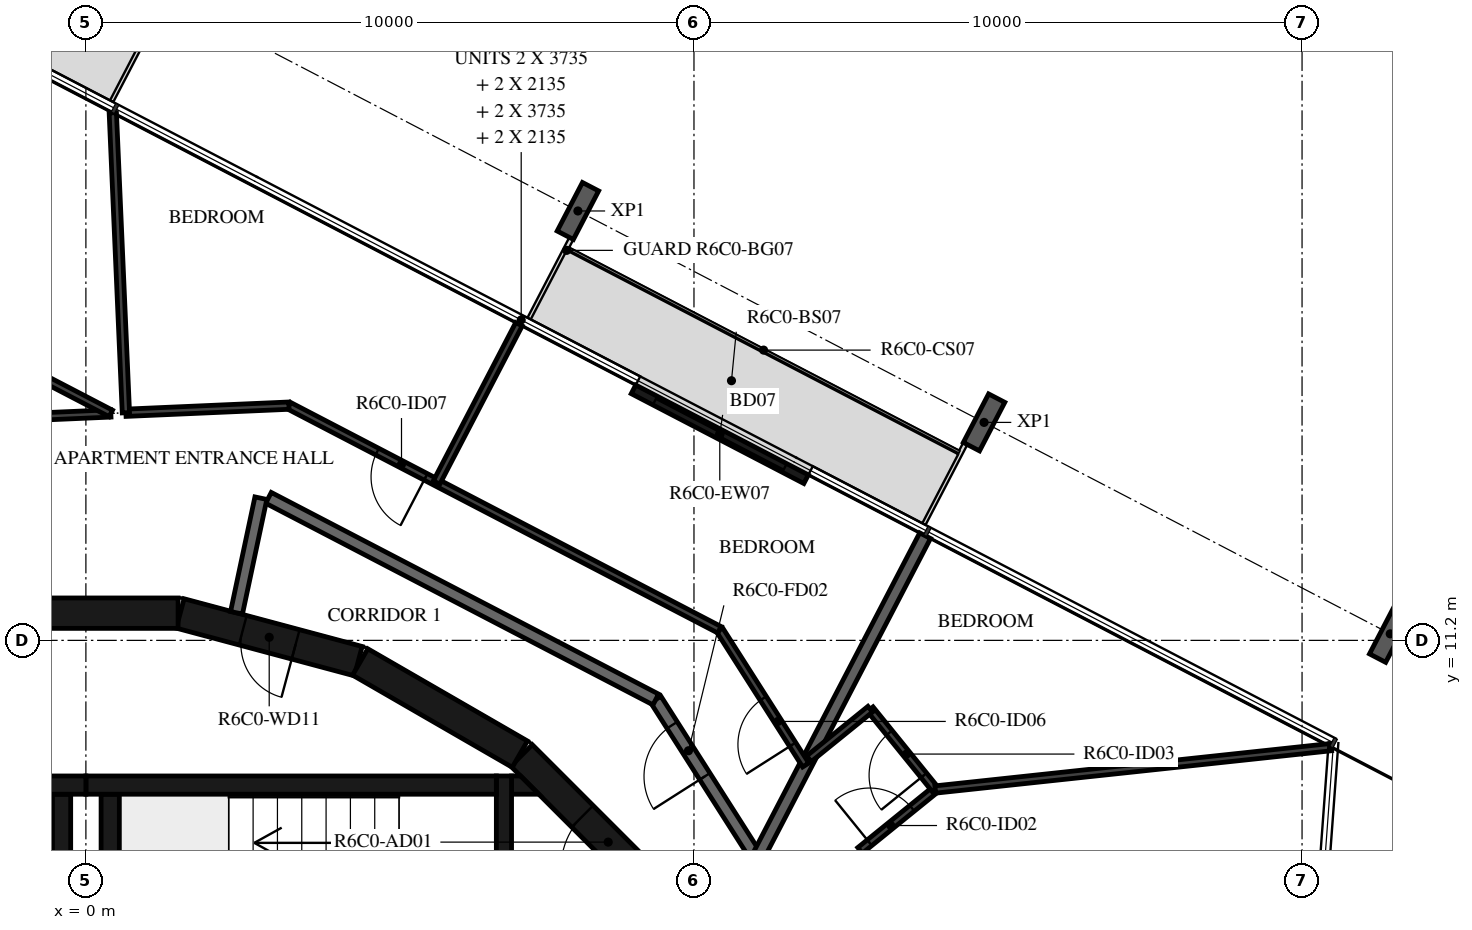
"""IFC4 building model, lengths in metres.
Left out: names, types, materials, properties, quantities, classifications, styles, units other than length and angle.
Written with IfcOpenShell. Run it as: python <this file> out.ifc"""

import sys

from ifc_helpers import new_model, si_unit, direction, frame, frame_2d, origin, origin_2d, place, context, subcontext, project, spatial, polyline, rectangle, i_section, outline, extrude, element, fill, save


model = new_model("IFC4")
c1 = context("Model", 3, precision=1e-05, world=origin(), true_north=direction((0.0, 1.0)))
c2 = subcontext(c1, "Body", "Model", "MODEL_VIEW")
j1 = project(units=[si_unit("LENGTHUNIT", "METRE"), si_unit("PLANEANGLEUNIT", "RADIAN")], contexts=[c1])
p1 = place(None, origin())
s1 = spatial("IfcSite", under=j1, at=p1, CompositionType="ELEMENT")
p2 = place(p1, origin())
s2 = spatial("IfcBuilding", under=s1, at=p2, CompositionType="ELEMENT")
p3 = place(p2, frame((0.0, 0.0, 254.7)))
s3 = spatial("IfcBuildingStorey", under=s2, at=p3, CompositionType="ELEMENT", Elevation=254.7)
for number, where, z_axis, x_axis in (
    (1, (21.45, 11.308, -0.38), (0.0, 0.0, 1.0), (0.887, -0.462, 0.0)),
    (2, (14.771, 14.784, -0.38), (0.0, 0.0, 1.0), (0.887, -0.462, 0.0)),
    (3, (8.091, 18.261, -0.38), (0.0, 0.0, 1.0), (0.887, -0.462, 0.0)),
):
    element("IfcColumn", number, at=place(p3, frame(where, z_axis=z_axis, x_axis=x_axis)), inside=s3, PredefinedType="COLUMN", context=c2, shape_type="SweptSolid", body=[
        extrude(i_section(OverallWidth=0.3, OverallDepth=0.9, WebThickness=0.019, FlangeThickness=0.035, FilletRadius=0.03, at=origin_2d()), origin(), (0.0, 0.0, 1.0), 2.616),
    ])
p4 = place(p3, frame((11.844, 13.851, 0.0), z_axis=(0.0, 0.0, 1.0), x_axis=(-0.887014349583, 0.461741858221, 0.0)))
e4 = element("IfcWall", 4, at=p4, inside=s3, PredefinedType="STANDARD", context=c2, shape_type="SweptSolid", body=[
    extrude(rectangle(XDim=3.2, YDim=0.16, at=frame_2d((1.6, 0.0))), origin(), (0.0, 0.0, 1.0), 3.05),
])
p5 = place(p4, frame((0.4, 0.0, 0.0)))
e5 = element("IfcOpeningElement", 5, at=p5, cuts=e4, PredefinedType="OPENING", context=c2, shape_type="SweptSolid", body=[
    extrude(rectangle(XDim=2.4, YDim=2.4, at=frame_2d((1.2, 1.2))), frame((0.0, 0.09, 0.0), z_axis=(0.0, -1.0, 0.0), x_axis=(1.0, 0.0, 0.0)), (0.0, 0.0, 1.0), 0.18),
])
p6 = place(p3, frame((9.308, 7.164, 0.0), z_axis=(0.0, 0.0, 1.0), x_axis=(-0.707106781187, 0.707106781187, 0.0)))
e6 = element("IfcWall", 6, at=p6, inside=s3, PredefinedType="SHEAR", context=c2, shape_type="SweptSolid", body=[
    extrude(rectangle(XDim=3.032, YDim=0.5, at=frame_2d((1.516, 0.0))), origin(), (0.0, 0.0, 1.0), 3.05),
])
p7 = place(p6, frame((0.416, 0.0, 0.0)))
e7 = element("IfcOpeningElement", 7, at=p7, cuts=e6, PredefinedType="OPENING", context=c2, shape_type="SweptSolid", body=[
    extrude(rectangle(XDim=1.2, YDim=2.1, at=frame_2d((0.6, 1.05))), frame((0.0, 0.26, 0.0), z_axis=(0.0, -1.0, 0.0), x_axis=(1.0, 0.0, 0.0)), (0.0, 0.0, 1.0), 0.52),
])
p8 = place(p3, frame((7.137, 9.329, 0.0), z_axis=(0.0, 0.0, 1.0), x_axis=(-0.865975092491, 0.500087131594, 0.0)))
e8 = element("IfcWall", 8, at=p8, inside=s3, PredefinedType="SHEAR", context=c2, shape_type="SweptSolid", body=[
    extrude(rectangle(XDim=3.033, YDim=0.5, at=frame_2d((1.516, 0.0))), origin(), (0.0, 0.0, 1.0), 3.05),
])
p9 = place(p3, frame((4.479, 10.858, 0.0), z_axis=(0.0, 0.0, 1.0), x_axis=(-0.965948410781, 0.258734743916, 0.0)))
e9 = element("IfcWall", 9, at=p9, inside=s3, PredefinedType="SHEAR", context=c2, shape_type="SweptSolid", body=[
    extrude(rectangle(XDim=3.033, YDim=0.5, at=frame_2d((1.516, 0.0))), origin(), (0.0, 0.0, 1.0), 3.05),
])
p10 = place(p9, frame((1.066, 0.0, 0.0)))
e10 = element("IfcOpeningElement", 10, at=p10, cuts=e9, PredefinedType="OPENING", context=c2, shape_type="SweptSolid", body=[
    extrude(rectangle(XDim=0.9, YDim=2.1, at=frame_2d((0.45, 1.05))), frame((0.0, 0.26, 0.0), z_axis=(0.0, -1.0, 0.0), x_axis=(1.0, 0.0, 0.0)), (0.0, 0.0, 1.0), 0.52),
])
p11 = place(p3, frame((1.516, 11.647, 0.0), z_axis=(0.0, 0.0, 1.0), x_axis=(-1.0, 0.0, 0.0)))
e11 = element("IfcWall", 11, at=p11, inside=s3, PredefinedType="SHEAR", context=c2, shape_type="SweptSolid", body=[
    extrude(rectangle(XDim=3.033, YDim=0.5, at=frame_2d((1.516, 0.0))), origin(), (0.0, 0.0, 1.0), 3.05),
])
p12 = place(p3, frame((0.0, 8.82, 0.0), z_axis=(0.0, 0.0, 1.0), x_axis=(1.0, 0.0, 0.0)))
e12 = element("IfcWall", 12, at=p12, inside=s3, PredefinedType="SHEAR", context=c2, shape_type="SweptSolid", body=[
    extrude(rectangle(XDim=6.75, YDim=0.3, at=frame_2d((3.375, 0.0))), origin(), (0.0, 0.0, 1.0), 3.05),
])
p13 = place(p3, frame((0.4, 5.35, 0.0), z_axis=(0.0, 0.0, 1.0), x_axis=(0.0, 1.0, 0.0)))
e13 = element("IfcWall", 13, at=p13, inside=s3, PredefinedType="SHEAR", context=c2, shape_type="SweptSolid", body=[
    extrude(rectangle(XDim=3.32, YDim=0.3, at=frame_2d((1.66, 0.0))), origin(), (0.0, 0.0, 1.0), 3.05),
])
p14 = place(p3, frame((6.875, 5.05, 0.0), z_axis=(0.0, 0.0, 1.0), x_axis=(0.0, 1.0, 0.0)))
e14 = element("IfcWall", 14, at=p14, inside=s3, PredefinedType="SHEAR", context=c2, shape_type="SweptSolid", body=[
    extrude(rectangle(XDim=3.92, YDim=0.25, at=frame_2d((1.96, 0.0))), origin(), (0.0, 0.0, 1.0), 3.05),
])
p15 = place(p14, frame((1.11, 0.0, 0.0)))
e15 = element("IfcOpeningElement", 15, at=p15, cuts=e14, PredefinedType="OPENING", context=c2, shape_type="SweptSolid", body=[
    extrude(rectangle(XDim=1.2, YDim=2.1, at=frame_2d((0.6, 1.05))), frame((0.0, 0.135, 0.0), z_axis=(0.0, -1.0, 0.0), x_axis=(1.0, 0.0, 0.0)), (0.0, 0.0, 1.0), 0.27),
])
p16 = place(p3, origin())
e16 = element("IfcWall", 16, at=p16, inside=s3, PredefinedType="SHEAR", context=c2, shape_type="SweptSolid", body=[
    extrude(outline(polyline([(7.448, 8.67), (7.0, 8.67), (7.0, 8.97), (7.148, 8.97), (7.448, 8.67)])), origin(), (0.0, 0.0, 1.0), 3.05),
])
p17 = place(p3, frame((-6.75, 8.82, 0.0), z_axis=(0.0, 0.0, 1.0), x_axis=(1.0, 0.0, 0.0)))
e17 = element("IfcWall", 17, at=p17, inside=s3, PredefinedType="SHEAR", context=c2, shape_type="SweptSolid", body=[
    extrude(rectangle(XDim=6.75, YDim=0.3, at=frame_2d((3.375, 0.0))), origin(), (0.0, 0.0, 1.0), 3.05),
])
p18 = place(p3, frame((-0.4, 5.35, 0.0), z_axis=(0.0, 0.0, 1.0), x_axis=(0.0, 1.0, 0.0)))
e18 = element("IfcWall", 18, at=p18, inside=s3, PredefinedType="SHEAR", context=c2, shape_type="SweptSolid", body=[
    extrude(rectangle(XDim=3.32, YDim=0.3, at=frame_2d((1.66, 0.0))), origin(), (0.0, 0.0, 1.0), 3.05),
])
p19 = place(p3, frame((13.231, 4.172, 0.0), z_axis=(0.0, 0.0, 1.0), x_axis=(-0.537304397561, 0.843388394728, 0.0)))
e19 = element("IfcWall", 19, at=p19, inside=s3, PredefinedType="STANDARD", context=c2, shape_type="SweptSolid", body=[
    extrude(rectangle(XDim=7.181, YDim=0.2, at=frame_2d((3.59, 0.0))), origin(), (0.0, 0.0, 1.0), 3.05),
])
p20 = place(p19, frame((2.881, 0.0, 0.0)))
e20 = element("IfcOpeningElement", 20, at=p20, cuts=e19, PredefinedType="OPENING", context=c2, shape_type="SweptSolid", body=[
    extrude(rectangle(XDim=1.0, YDim=2.1, at=frame_2d((0.5, 1.05))), frame((0.0, 0.11, 0.0), z_axis=(0.0, -1.0, 0.0), x_axis=(1.0, 0.0, 0.0)), (0.0, 0.0, 1.0), 0.22),
])
p21 = place(p19, frame((5.681, 0.0, 0.0)))
e21 = element("IfcOpeningElement", 21, at=p21, cuts=e19, PredefinedType="OPENING", context=c2, shape_type="SweptSolid", body=[
    extrude(rectangle(XDim=1.0, YDim=2.1, at=frame_2d((0.5, 1.05))), frame((0.0, 0.11, 0.0), z_axis=(0.0, -1.0, 0.0), x_axis=(1.0, 0.0, 0.0)), (0.0, 0.0, 1.0), 0.22),
])
p22 = place(p3, frame((9.372, 10.228, 0.0), z_axis=(0.0, 0.0, 1.0), x_axis=(-0.887005184532, 0.461759464021, 0.0)))
e22 = element("IfcWall", 22, at=p22, inside=s3, PredefinedType="STANDARD", context=c2, shape_type="SweptSolid", body=[
    extrude(rectangle(XDim=7.181, YDim=0.2, at=frame_2d((3.591, 0.0))), origin(), (0.0, 0.0, 1.0), 3.05),
])
p23 = place(p3, frame((2.878, 13.538, 0.0), z_axis=(0.0, 0.0, 1.0), x_axis=(-0.207893604596, -0.978151444904, 0.0)))
e23 = element("IfcWall", 23, at=p23, inside=s3, PredefinedType="STANDARD", context=c2, shape_type="SweptSolid", body=[
    extrude(rectangle(XDim=1.927, YDim=0.2, at=frame_2d((0.963, 0.0))), origin(), (0.0, 0.0, 1.0), 3.05),
])
p24 = place(p3, frame((13.801, 12.922, 0.0), z_axis=(0.0, 0.0, 1.0), x_axis=(-0.461726485624, -0.887022351733, 0.0)))
e24 = element("IfcWall", 24, at=p24, inside=s3, PredefinedType="STANDARD", context=c2, shape_type="SweptSolid", body=[
    extrude(rectangle(XDim=5.984, YDim=0.2, at=frame_2d((2.992, 0.0))), origin(), (0.0, 0.0, 1.0), 3.05),
])
p25 = place(p3, frame((12.732, 7.746, 0.0), z_axis=(0.0, 0.0, 1.0), x_axis=(0.777187694298, 0.62926885179, 0.0)))
e25 = element("IfcWall", 25, at=p25, inside=s3, PredefinedType="PARTITIONING", context=c2, shape_type="SweptSolid", body=[
    extrude(rectangle(XDim=1.591, YDim=0.12, at=frame_2d((0.795, 0.0))), origin(), (0.0, 0.0, 1.0), 3.05),
])
p26 = place(p25, frame((0.2, 0.0, 0.0)))
e26 = element("IfcOpeningElement", 26, at=p26, cuts=e25, PredefinedType="OPENING", context=c2, shape_type="SweptSolid", body=[
    extrude(rectangle(XDim=0.9, YDim=2.1, at=frame_2d((0.45, 1.05))), frame((0.0, 0.07, 0.0), z_axis=(0.0, -1.0, 0.0), x_axis=(1.0, 0.0, 0.0)), (0.0, 0.0, 1.0), 0.14),
])
p27 = place(p3, frame((13.969, 8.747, 0.0), z_axis=(0.0, 0.0, 1.0), x_axis=(-0.629359312443, 0.777114441921, 0.0)))
e27 = element("IfcWall", 27, at=p27, inside=s3, PredefinedType="PARTITIONING", context=c2, shape_type="SweptSolid", body=[
    extrude(rectangle(XDim=1.7, YDim=0.12, at=frame_2d((0.85, 0.0))), origin(), (0.0, 0.0, 1.0), 3.05),
])
p28 = place(p27, frame((0.3, 0.0, 0.0)))
e28 = element("IfcOpeningElement", 28, at=p28, cuts=e27, PredefinedType="OPENING", context=c2, shape_type="SweptSolid", body=[
    extrude(rectangle(XDim=0.9, YDim=2.1, at=frame_2d((0.45, 1.05))), frame((0.0, 0.07, 0.0), z_axis=(0.0, -1.0, 0.0), x_axis=(1.0, 0.0, 0.0)), (0.0, 0.0, 1.0), 0.14),
])
p29 = place(p3, frame((12.898, 10.069, 0.0), z_axis=(0.0, 0.0, 1.0), x_axis=(-0.777069405334, -0.629414918232, 0.0)))
e29 = element("IfcWall", 29, at=p29, inside=s3, PredefinedType="PARTITIONING", context=c2, shape_type="SweptSolid", body=[
    extrude(rectangle(XDim=1.296, YDim=0.12, at=frame_2d((0.648, 0.0))), origin(), (0.0, 0.0, 1.0), 3.05),
])
p30 = place(p3, frame((20.48, 9.445, 0.0), z_axis=(0.0, 0.0, 1.0), x_axis=(-0.994311974195, -0.106506797776, 0.0)))
e30 = element("IfcWall", 30, at=p30, inside=s3, PredefinedType="PARTITIONING", context=c2, shape_type="SweptSolid", body=[
    extrude(rectangle(XDim=6.549, YDim=0.12, at=frame_2d((3.274, 0.0))), origin(), (0.0, 0.0, 1.0), 3.05),
])
p31 = place(p3, frame((11.838, 9.15, 0.0), z_axis=(0.0, 0.0, 1.0), x_axis=(-0.537288949014, 0.843398236462, 0.0)))
e31 = element("IfcWall", 31, at=p31, inside=s3, PredefinedType="PARTITIONING", context=c2, shape_type="SweptSolid", body=[
    extrude(rectangle(XDim=2.636, YDim=0.12, at=frame_2d((1.318, 0.0))), origin(), (0.0, 0.0, 1.0), 3.05),
])
p32 = place(p31, frame((0.4, 0.0, 0.0)))
e32 = element("IfcOpeningElement", 32, at=p32, cuts=e31, PredefinedType="OPENING", context=c2, shape_type="SweptSolid", body=[
    extrude(rectangle(XDim=0.9, YDim=2.1, at=frame_2d((0.45, 1.05))), frame((0.0, 0.07, 0.0), z_axis=(0.0, -1.0, 0.0), x_axis=(1.0, 0.0, 0.0)), (0.0, 0.0, 1.0), 0.14),
])
p33 = place(p3, frame((10.421, 11.373, 0.0), z_axis=(0.0, 0.0, 1.0), x_axis=(-0.887012970857, 0.461744506769, 0.0)))
e33 = element("IfcWall", 33, at=p33, inside=s3, PredefinedType="PARTITIONING", context=c2, shape_type="SweptSolid", body=[
    extrude(rectangle(XDim=7.985, YDim=0.12, at=frame_2d((3.992, 0.0))), origin(), (0.0, 0.0, 1.0), 3.05),
])
p34 = place(p33, frame((5.448, 0.0, 0.0)))
e34 = element("IfcOpeningElement", 34, at=p34, cuts=e33, PredefinedType="OPENING", context=c2, shape_type="SweptSolid", body=[
    extrude(rectangle(XDim=0.9, YDim=2.1, at=frame_2d((0.45, 1.05))), frame((0.0, 0.07, 0.0), z_axis=(0.0, -1.0, 0.0), x_axis=(1.0, 0.0, 0.0)), (0.0, 0.0, 1.0), 0.14),
])
p35 = place(p3, frame((3.339, 15.06, 0.0), z_axis=(0.0, 0.0, 1.0), x_axis=(-0.999045829762, -0.043674134634, 0.0)))
e35 = element("IfcWall", 35, at=p35, inside=s3, PredefinedType="PARTITIONING", context=c2, shape_type="SweptSolid", body=[
    extrude(rectangle(XDim=2.683, YDim=0.12, at=frame_2d((1.342, 0.0))), origin(), (0.0, 0.0, 1.0), 3.05),
])
p36 = place(p3, frame((0.41, 14.932, 0.0), z_axis=(0.0, 0.0, 1.0), x_axis=(-0.99904802852, -0.043623808982, 0.0)))
e36 = element("IfcWall", 36, at=p36, inside=s3, PredefinedType="PARTITIONING", context=c2, shape_type="SweptSolid", body=[
    extrude(rectangle(XDim=5.054, YDim=0.12, at=frame_2d((2.527, 0.0))), origin(), (0.0, 0.0, 1.0), 3.05),
])
p37 = place(p36, frame((1.5, 0.0, 0.0)))
e37 = element("IfcOpeningElement", 37, at=p37, cuts=e36, PredefinedType="OPENING", context=c2, shape_type="SweptSolid", body=[
    extrude(rectangle(XDim=0.8, YDim=2.1, at=frame_2d((0.4, 1.05))), frame((0.0, 0.07, 0.0), z_axis=(0.0, -1.0, 0.0), x_axis=(1.0, 0.0, 0.0)), (0.0, 0.0, 1.0), 0.14),
])
p38 = place(p3, frame((7.122, 16.399, 0.0), z_axis=(0.0, 0.0, 1.0), x_axis=(-0.461763975246, -0.887002836053, 0.0)))
e38 = element("IfcWall", 38, at=p38, inside=s3, PredefinedType="PARTITIONING", context=c2, shape_type="SweptSolid", body=[
    extrude(rectangle(XDim=2.934, YDim=0.12, at=frame_2d((1.467, 0.0))), origin(), (0.0, 0.0, 1.0), 3.05),
])
p39 = place(p3, frame((0.442, 19.876, 0.0), z_axis=(0.0, 0.0, 1.0), x_axis=(0.04366038102, -0.999046430918, 0.0)))
e39 = element("IfcWall", 39, at=p39, inside=s3, PredefinedType="PARTITIONING", context=c2, shape_type="SweptSolid", body=[
    extrude(rectangle(XDim=4.938, YDim=0.12, at=frame_2d((2.469, 0.0))), origin(), (0.0, 0.0, 1.0), 3.05),
])
p40 = place(p3, frame((0.41, 14.932, 0.0), z_axis=(0.0, 0.0, 1.0), x_axis=(-0.887012293034, 0.461745808867, 0.0)))
e40 = element("IfcWall", 40, at=p40, inside=s3, PredefinedType="PARTITIONING", context=c2, shape_type="SweptSolid", body=[
    extrude(rectangle(XDim=10.246, YDim=0.12, at=frame_2d((5.123, 0.0))), origin(), (0.0, 0.0, 1.0), 3.05),
])
p41 = place(p40, frame((4.725, 0.0, 0.0)))
e41 = element("IfcOpeningElement", 41, at=p41, cuts=e40, PredefinedType="OPENING", context=c2, shape_type="SweptSolid", body=[
    extrude(rectangle(XDim=0.9, YDim=2.1, at=frame_2d((0.45, 1.05))), frame((0.0, 0.07, 0.0), z_axis=(0.0, -1.0, 0.0), x_axis=(1.0, 0.0, 0.0)), (0.0, 0.0, 1.0), 0.14),
])
p42 = place(p5, origin())
e42 = element("IfcDoor", 42, at=p42, inside=s3, OperationType="DOUBLE_DOOR_SLIDING", PredefinedType="DOOR", context=c2, shape_type="SweptSolid", body=[
    extrude(rectangle(XDim=2.4, YDim=2.4, at=frame_2d((1.2, 1.2))), frame((0.0, 0.025, 0.0), z_axis=(0.0, -1.0, 0.0), x_axis=(1.0, 0.0, 0.0)), (0.0, 0.0, 1.0), 0.05),
])
fill(e5, e42)
p43 = place(p7, origin())
e43 = element("IfcDoor", 43, at=p43, inside=s3, OperationType="SINGLE_SWING_RIGHT", PredefinedType="DOOR", context=c2, shape_type="SweptSolid", body=[
    extrude(rectangle(XDim=1.2, YDim=2.1, at=frame_2d((0.6, 1.05))), frame((0.0, 0.025, 0.0), z_axis=(0.0, -1.0, 0.0), x_axis=(1.0, 0.0, 0.0)), (0.0, 0.0, 1.0), 0.05),
])
fill(e7, e43)
p44 = place(p10, origin())
e44 = element("IfcDoor", 44, at=p44, inside=s3, OperationType="SINGLE_SWING_LEFT", PredefinedType="DOOR", context=c2, shape_type="SweptSolid", body=[
    extrude(rectangle(XDim=0.9, YDim=2.1, at=frame_2d((0.45, 1.05))), frame((0.0, 0.025, 0.0), z_axis=(0.0, -1.0, 0.0), x_axis=(1.0, 0.0, 0.0)), (0.0, 0.0, 1.0), 0.05),
])
fill(e10, e44)
p45 = place(p26, origin())
e45 = element("IfcDoor", 45, at=p45, inside=s3, OperationType="SINGLE_SWING_RIGHT", PredefinedType="DOOR", context=c2, shape_type="SweptSolid", body=[
    extrude(rectangle(XDim=0.9, YDim=2.1, at=frame_2d((0.45, 1.05))), frame((0.0, 0.025, 0.0), z_axis=(0.0, -1.0, 0.0), x_axis=(1.0, 0.0, 0.0)), (0.0, 0.0, 1.0), 0.05),
])
fill(e26, e45)
p46 = place(p28, origin())
e46 = element("IfcDoor", 46, at=p46, inside=s3, OperationType="SINGLE_SWING_LEFT", PredefinedType="DOOR", context=c2, shape_type="SweptSolid", body=[
    extrude(rectangle(XDim=0.9, YDim=2.1, at=frame_2d((0.45, 1.05))), frame((0.0, 0.025, 0.0), z_axis=(0.0, -1.0, 0.0), x_axis=(1.0, 0.0, 0.0)), (0.0, 0.0, 1.0), 0.05),
])
fill(e28, e46)
p47 = place(p21, origin())
e47 = element("IfcDoor", 47, at=p47, inside=s3, OperationType="SINGLE_SWING_LEFT", PredefinedType="DOOR", context=c2, shape_type="SweptSolid", body=[
    extrude(rectangle(XDim=1.0, YDim=2.1, at=frame_2d((0.5, 1.05))), frame((0.0, 0.025, 0.0), z_axis=(0.0, -1.0, 0.0), x_axis=(1.0, 0.0, 0.0)), (0.0, 0.0, 1.0), 0.05),
])
fill(e21, e47)
p48 = place(p32, origin())
e48 = element("IfcDoor", 48, at=p48, inside=s3, OperationType="SINGLE_SWING_LEFT", PredefinedType="DOOR", context=c2, shape_type="SweptSolid", body=[
    extrude(rectangle(XDim=0.9, YDim=2.1, at=frame_2d((0.45, 1.05))), frame((0.0, 0.025, 0.0), z_axis=(0.0, -1.0, 0.0), x_axis=(1.0, 0.0, 0.0)), (0.0, 0.0, 1.0), 0.05),
])
fill(e32, e48)
p49 = place(p34, origin())
e49 = element("IfcDoor", 49, at=p49, inside=s3, OperationType="SINGLE_SWING_RIGHT", PredefinedType="DOOR", context=c2, shape_type="SweptSolid", body=[
    extrude(rectangle(XDim=0.9, YDim=2.1, at=frame_2d((0.45, 1.05))), frame((0.0, 0.025, 0.0), z_axis=(0.0, -1.0, 0.0), x_axis=(1.0, 0.0, 0.0)), (0.0, 0.0, 1.0), 0.05),
])
fill(e34, e49)
save(model, sys.argv[1])
